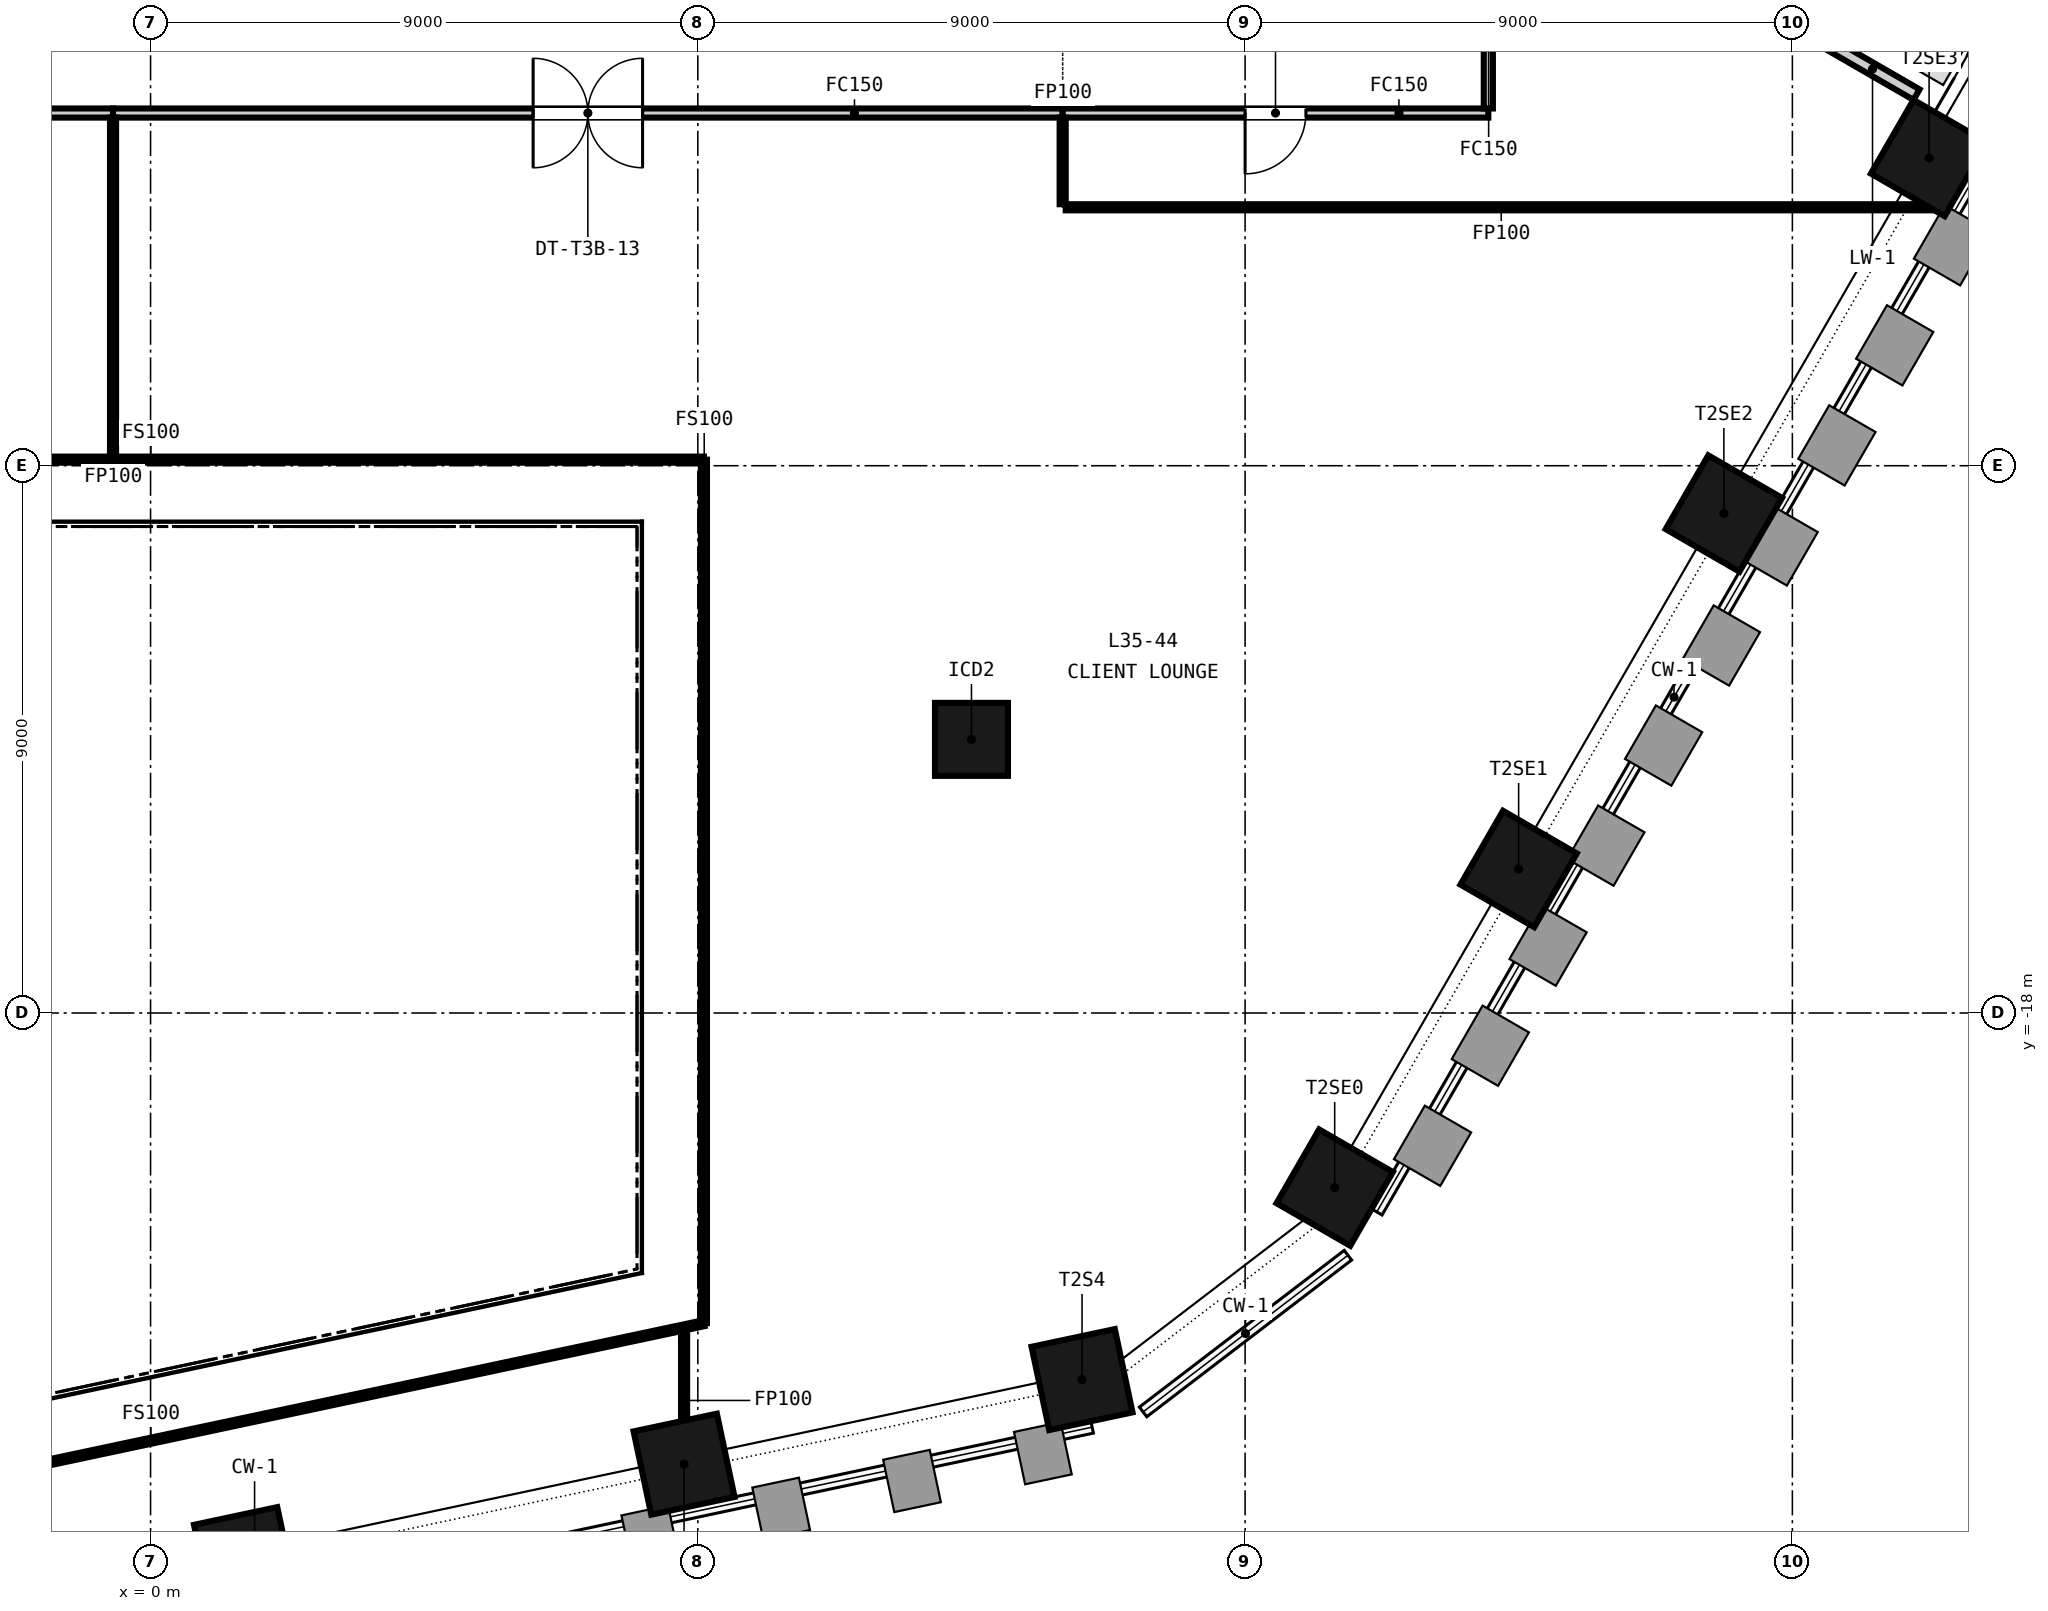
"""IFC4 building model, lengths in metres.
Left out: names, types, materials, properties, quantities, classifications, styles, units other than length and angle.
Written with IfcOpenShell. Run it as: python <this file> out.ifc"""

import sys

from ifc_helpers import new_model, si_unit, direction, frame, frame_2d, origin, origin_2d, place, context, subcontext, project, spatial, rectangle, extrude, element, fill, save


model = new_model("IFC4")
c1 = context("Model", 3, precision=1e-05, world=origin(), true_north=direction((0.0, 1.0)))
c2 = subcontext(c1, "Body", "Model", "MODEL_VIEW")
j1 = project(units=[si_unit("LENGTHUNIT", "METRE"), si_unit("PLANEANGLEUNIT", "RADIAN")], contexts=[c1])
p1 = place(None, origin())
s1 = spatial("IfcSite", under=j1, at=p1, CompositionType="ELEMENT")
p2 = place(p1, origin())
s2 = spatial("IfcBuilding", under=s1, at=p2, CompositionType="ELEMENT")
p3 = place(p2, frame((0.0, 0.0, 144.4)))
s3 = spatial("IfcBuildingStorey", under=s2, at=p3, CompositionType="ELEMENT", Elevation=144.4)
for number, where, z_axis, x_axis in (
    (1, (1.544, -26.956, -0.15), (0.0, 0.0, 1.0), (0.978, 0.208, 0.0)),
    (2, (8.774, -25.419, -0.15), (0.0, 0.0, 1.0), (0.978, 0.208, 0.0)),
    (3, (15.318, -24.028, -0.15), (0.0, 0.0, 1.0), (0.978, 0.208, 0.0)),
    (4, (19.473, -20.871, -0.15), (0.0, 0.0, 1.0), (0.5, 0.866, 0.0)),
    (5, (22.498, -15.632, -0.15), (0.0, 0.0, 1.0), (0.5, 0.866, 0.0)),
    (6, (25.873, -9.786, -0.15), (0.0, 0.0, 1.0), (0.5, 0.866, 0.0)),
    (7, (29.248, -3.94, -0.15), (0.0, 0.0, 1.0), (0.5, 0.866, 0.0)),
):
    element("IfcColumn", number, at=place(p3, frame(where, z_axis=z_axis, x_axis=x_axis)), inside=s3, PredefinedType="COLUMN", context=c2, shape_type="SweptSolid", body=[
        extrude(rectangle(XDim=1.4, YDim=1.4, at=origin_2d()), origin(), (0.0, 0.0, 1.0), 3.65),
    ])
p4 = place(p3, frame((13.5, -13.5, -0.15), z_axis=(0.0, 0.0, 1.0), x_axis=(1.0, 0.0, 0.0)))
e8 = element("IfcColumn", 8, at=p4, inside=s3, PredefinedType="COLUMN", context=c2, shape_type="SweptSolid", body=[
    extrude(rectangle(XDim=1.2, YDim=1.2, at=origin_2d()), origin(), (0.0, 0.0, 1.0), 3.65),
])
p5 = place(p3, frame((29.042, -2.897, 0.0), z_axis=(0.0, 0.0, 1.0), x_axis=(-0.866031085144, 0.499990159468, 0.0)))
e9 = element("IfcWall", 9, at=p5, inside=s3, PredefinedType="SOLIDWALL", context=c2, shape_type="SweptSolid", body=[
    extrude(rectangle(XDim=1.684, YDim=0.2, at=frame_2d((0.842, 0.0))), origin(), (0.0, 0.0, 1.0), 3.05),
])
p6 = place(p3, frame((-0.617, -3.2, 0.0), z_axis=(0.0, 0.0, 1.0), x_axis=(-1.0, 0.0, 0.0)))
e10 = element("IfcWall", 10, at=p6, inside=s3, PredefinedType="PARTITIONING", context=c2, shape_type="SweptSolid", body=[
    extrude(rectangle(XDim=14.383, YDim=0.15, at=frame_2d((7.191, 0.0))), origin(), (0.0, 0.0, 1.0), 2.741),
])
p7 = place(p6, frame((6.292, 0.0, 0.0)))
e11 = element("IfcOpeningElement", 11, at=p7, cuts=e10, PredefinedType="OPENING", context=c2, shape_type="SweptSolid", body=[
    extrude(rectangle(XDim=1.8, YDim=2.1, at=frame_2d((0.9, 1.05))), frame((0.0, 0.085, 0.0), z_axis=(0.0, -1.0, 0.0), x_axis=(1.0, 0.0, 0.0)), (0.0, 0.0, 1.0), 0.17),
])
p8 = place(p3, frame((15.0, -3.2, 0.0), z_axis=(0.0, 0.0, 1.0), x_axis=(-1.0, 0.0, 0.0)))
e12 = element("IfcWall", 12, at=p8, inside=s3, PredefinedType="PARTITIONING", context=c2, shape_type="SweptSolid", body=[
    extrude(rectangle(XDim=15.617, YDim=0.15, at=frame_2d((7.809, 0.0))), origin(), (0.0, 0.0, 1.0), 2.741),
])
p9 = place(p8, frame((6.908, 0.0, 0.0)))
e13 = element("IfcOpeningElement", 13, at=p9, cuts=e12, PredefinedType="OPENING", context=c2, shape_type="SweptSolid", body=[
    extrude(rectangle(XDim=1.8, YDim=2.1, at=frame_2d((0.9, 1.05))), frame((0.0, 0.085, 0.0), z_axis=(0.0, -1.0, 0.0), x_axis=(1.0, 0.0, 0.0)), (0.0, 0.0, 1.0), 0.17),
])
p10 = place(p3, frame((22.0, -3.2, 0.0), z_axis=(0.0, 0.0, 1.0), x_axis=(-1.0, 0.0, 0.0)))
e14 = element("IfcWall", 14, at=p10, inside=s3, PredefinedType="PARTITIONING", context=c2, shape_type="SweptSolid", body=[
    extrude(rectangle(XDim=7.0, YDim=0.15, at=frame_2d((3.5, 0.0))), origin(), (0.0, 0.0, 1.0), 2.741),
])
p11 = place(p10, frame((3.0, 0.0, 0.0)))
e15 = element("IfcOpeningElement", 15, at=p11, cuts=e14, PredefinedType="OPENING", context=c2, shape_type="SweptSolid", body=[
    extrude(rectangle(XDim=1.0, YDim=2.1, at=frame_2d((0.5, 1.05))), frame((0.0, 0.085, 0.0), z_axis=(0.0, -1.0, 0.0), x_axis=(1.0, 0.0, 0.0)), (0.0, 0.0, 1.0), 0.17),
])
p12 = place(p3, frame((22.0, 0.0, 0.0), z_axis=(0.0, 0.0, 1.0), x_axis=(0.0, -1.0, 0.0)))
e16 = element("IfcWall", 16, at=p12, inside=s3, PredefinedType="PARTITIONING", context=c2, shape_type="SweptSolid", body=[
    extrude(rectangle(XDim=3.125, YDim=0.15, at=frame_2d((1.562, 0.0))), origin(), (0.0, 0.0, 1.0), 2.741),
])
p13 = place(p3, frame((15.05, -4.75, 0.0), z_axis=(0.0, 0.0, 1.0), x_axis=(1.0, 0.0, 0.0)))
e17 = element("IfcWall", 17, at=p13, inside=s3, PredefinedType="PARTITIONING", context=c2, shape_type="SweptSolid", body=[
    extrude(rectangle(XDim=14.314, YDim=0.1, at=frame_2d((7.157, 0.0))), origin(), (0.0, 0.0, 1.0), 2.741),
])
p14 = place(p3, frame((-0.617, -8.85, 0.0), z_axis=(0.0, 0.0, 1.0), x_axis=(0.0, 1.0, 0.0)))
e18 = element("IfcWall", 18, at=p14, inside=s3, PredefinedType="PARTITIONING", context=c2, shape_type="SweptSolid", body=[
    extrude(rectangle(XDim=5.575, YDim=0.1, at=frame_2d((2.788, 0.0))), origin(), (0.0, 0.0, 1.0), 2.741),
])
p15 = place(p3, frame((8.774, -25.522, 0.0), z_axis=(0.0, 0.0, 1.0), x_axis=(0.0, 1.0, 0.0)))
e19 = element("IfcWall", 19, at=p15, inside=s3, PredefinedType="PARTITIONING", context=c2, shape_type="SweptSolid", body=[
    extrude(rectangle(XDim=2.301, YDim=0.1, at=frame_2d((1.15, 0.0))), origin(), (0.0, 0.0, 1.0), 2.741),
])
p16 = place(p3, frame((15.0, -4.7, 0.0), z_axis=(0.0, 0.0, 1.0), x_axis=(0.0, 1.0, 0.0)))
e20 = element("IfcWall", 20, at=p16, inside=s3, PredefinedType="PARTITIONING", context=c2, shape_type="SweptSolid", body=[
    extrude(rectangle(XDim=1.425, YDim=0.1, at=frame_2d((0.712, 0.0))), origin(), (0.0, 0.0, 1.0), 2.741),
])
p17 = place(p3, frame((-9.1, -8.9, 0.0), z_axis=(0.0, 0.0, 1.0), x_axis=(1.0, 0.0, 0.0)))
e21 = element("IfcWall", 21, at=p17, inside=s3, PredefinedType="PARTITIONING", context=c2, shape_type="SweptSolid", body=[
    extrude(rectangle(XDim=18.2, YDim=0.1, at=frame_2d((9.1, 0.0))), origin(), (0.0, 0.0, 1.0), 2.741),
])
p18 = place(p3, frame((9.1, -8.9, 0.0), z_axis=(0.0, 0.0, 1.0), x_axis=(0.0, -1.0, 0.0)))
e22 = element("IfcWall", 22, at=p18, inside=s3, PredefinedType="PARTITIONING", context=c2, shape_type="SweptSolid", body=[
    extrude(rectangle(XDim=14.201, YDim=0.1, at=frame_2d((7.101, 0.0))), origin(), (0.0, 0.0, 1.0), 2.741),
])
p19 = place(p3, frame((9.1, -23.101, 0.0), z_axis=(0.0, 0.0, 1.0), x_axis=(-0.978146710971, -0.207915876778, 0.0)))
e23 = element("IfcWall", 23, at=p19, inside=s3, PredefinedType="PARTITIONING", context=c2, shape_type="SweptSolid", body=[
    extrude(rectangle(XDim=18.607, YDim=0.1, at=frame_2d((9.303, 0.0))), origin(), (0.0, 0.0, 1.0), 2.741),
])
p20 = place(p11, origin())
e24 = element("IfcDoor", 24, at=p20, inside=s3, OperationType="SINGLE_SWING_RIGHT", PredefinedType="DOOR", context=c2, shape_type="SweptSolid", body=[
    extrude(rectangle(XDim=1.0, YDim=2.1, at=frame_2d((0.5, 1.05))), frame((0.0, 0.025, 0.0), z_axis=(0.0, -1.0, 0.0), x_axis=(1.0, 0.0, 0.0)), (0.0, 0.0, 1.0), 0.05),
])
fill(e15, e24)
p21 = place(p9, origin())
e25 = element("IfcDoor", 25, at=p21, inside=s3, OperationType="DOUBLE_DOOR_DOUBLE_SWING", PredefinedType="DOOR", context=c2, shape_type="SweptSolid", body=[
    extrude(rectangle(XDim=1.8, YDim=2.1, at=frame_2d((0.9, 1.05))), frame((0.0, 0.025, 0.0), z_axis=(0.0, -1.0, 0.0), x_axis=(1.0, 0.0, 0.0)), (0.0, 0.0, 1.0), 0.05),
])
fill(e13, e25)
save(model, sys.argv[1])
